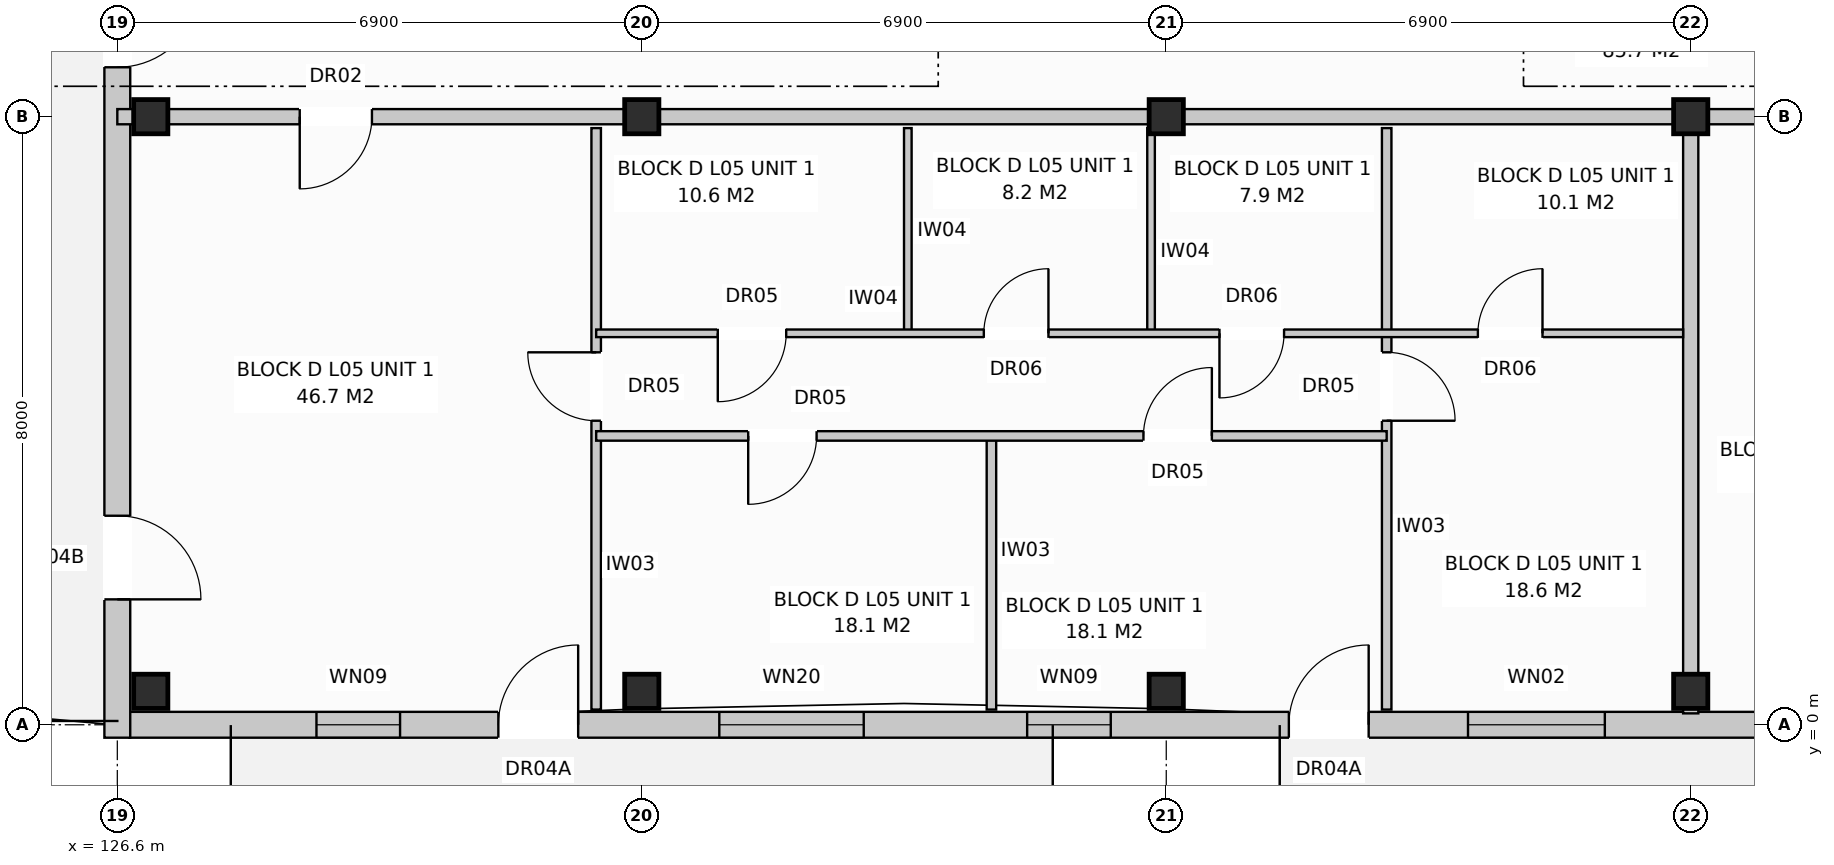
"""IFC4 building model, lengths in metres.
Left out: names, types, materials, properties, quantities, classifications, styles, units other than length and angle.
Written with IfcOpenShell. Run it as: python <this file> out.ifc"""

import sys

from ifc_helpers import new_model, si_unit, direction, frame, frame_2d, origin, origin_with_axes, origin_2d, place, context, subcontext, project, spatial, rectangle, extrude, element, fill, save


model = new_model("IFC4")
c1 = context("Model", 3, precision=1e-05, world=origin(), true_north=direction((0.0, 1.0)))
c2 = subcontext(c1, "Body", "Model", "MODEL_VIEW")
j1 = project(units=[si_unit("LENGTHUNIT", "METRE"), si_unit("PLANEANGLEUNIT", "RADIAN")], contexts=[c1])
p1 = place(None, origin())
s1 = spatial("IfcSite", under=j1, at=p1, CompositionType="ELEMENT")
p2 = place(p1, origin())
s2 = spatial("IfcBuilding", under=s1, at=p2, CompositionType="ELEMENT")
p3 = place(p2, frame((0.0, 0.0, 17.6)))
s3 = spatial("IfcBuildingStorey", under=s2, at=p3, CompositionType="ELEMENT", Elevation=17.6)
for number, where, z_axis, x_axis in (
    (1, (127.04, 0.44, 0.0), (0.0, 0.0, 1.0), (1.0, 0.0, 0.0)),
    (2, (127.04, 8.0, 0.0), (0.0, 0.0, 1.0), (1.0, 0.0, 0.0)),
    (3, (133.5, 0.44, 0.0), (0.0, 0.0, 1.0), (1.0, 0.0, 0.0)),
    (4, (133.5, 8.0, 0.0), (0.0, 0.0, 1.0), (1.0, 0.0, 0.0)),
    (5, (140.4, 0.44, 0.0), (0.0, 0.0, 1.0), (1.0, 0.0, 0.0)),
    (6, (140.4, 8.0, 0.0), (0.0, 0.0, 1.0), (1.0, 0.0, 0.0)),
    (7, (147.3, 0.44, 0.0), (0.0, 0.0, 1.0), (1.0, 0.0, 0.0)),
    (8, (147.3, 8.0, 0.0), (0.0, 0.0, 1.0), (1.0, 0.0, 0.0)),
):
    element("IfcColumn", number, at=place(p3, frame(where, z_axis=z_axis, x_axis=x_axis)), inside=s3, PredefinedType="COLUMN", context=c2, shape_type="SweptSolid", body=[
        extrude(rectangle(XDim=0.45, YDim=0.45, at=origin_2d()), origin(), (0.0, 0.0, 1.0), 3.2),
    ])
p4 = place(p3, frame((126.76, 0.0, 0.0), z_axis=(0.0, 0.0, 1.0), x_axis=(1.0, 0.0, 0.0)))
e9 = element("IfcWall", 9, at=p4, inside=s3, PredefinedType="STANDARD", context=c2, shape_type="SweptSolid", body=[
    extrude(rectangle(XDim=41.08, YDim=0.34, at=frame_2d((20.54, 0.0))), origin(), (0.0, 0.0, 1.0), 2.95),
])
p5 = place(p4, frame((4.853, 0.0, 0.0)))
e10 = element("IfcOpeningElement", 10, at=p5, cuts=e9, PredefinedType="OPENING", context=c2, shape_type="SweptSolid", body=[
    extrude(rectangle(XDim=1.05, YDim=2.12, at=frame_2d((0.525, 1.06))), frame((0.0, 0.182, 0.0), z_axis=(0.0, -1.0, 0.0), x_axis=(1.0, 0.0, 0.0)), (0.0, 0.0, 1.0), 0.364),
])
p6 = place(p4, frame((15.253, 0.0, 0.0)))
e11 = element("IfcOpeningElement", 11, at=p6, cuts=e9, PredefinedType="OPENING", context=c2, shape_type="SweptSolid", body=[
    extrude(rectangle(XDim=1.05, YDim=2.12, at=frame_2d((0.525, 1.06))), frame((0.0, 0.182, 0.0), z_axis=(0.0, -1.0, 0.0), x_axis=(1.0, 0.0, 0.0)), (0.0, 0.0, 1.0), 0.364),
])
p7 = place(p4, frame((30.353, 0.0, 0.0)))
e12 = element("IfcOpeningElement", 12, at=p7, cuts=e9, PredefinedType="OPENING", context=c2, shape_type="SweptSolid", body=[
    extrude(rectangle(XDim=1.05, YDim=2.12, at=frame_2d((0.525, 1.06))), frame((0.0, 0.182, 0.0), z_axis=(0.0, -1.0, 0.0), x_axis=(1.0, 0.0, 0.0)), (0.0, 0.0, 1.0), 0.364),
])
p8 = place(p4, frame((2.46, 0.0, 0.72)))
e13 = element("IfcOpeningElement", 13, at=p8, cuts=e9, PredefinedType="OPENING", context=c2, shape_type="SweptSolid", body=[
    extrude(rectangle(XDim=1.1, YDim=1.5, at=frame_2d((0.55, 0.75))), frame((0.0, 0.182, 0.0), z_axis=(0.0, -1.0, 0.0), x_axis=(1.0, 0.0, 0.0)), (0.0, 0.0, 1.0), 0.364),
])
p9 = place(p4, frame((7.76, 0.0, 0.72)))
e14 = element("IfcOpeningElement", 14, at=p9, cuts=e9, PredefinedType="OPENING", context=c2, shape_type="SweptSolid", body=[
    extrude(rectangle(XDim=1.9, YDim=1.85, at=frame_2d((0.95, 0.925))), frame((0.0, 0.182, 0.0), z_axis=(0.0, -1.0, 0.0), x_axis=(1.0, 0.0, 0.0)), (0.0, 0.0, 1.0), 0.364),
])
p10 = place(p4, frame((11.81, 0.0, 0.72)))
e15 = element("IfcOpeningElement", 15, at=p10, cuts=e9, PredefinedType="OPENING", context=c2, shape_type="SweptSolid", body=[
    extrude(rectangle(XDim=1.1, YDim=1.5, at=frame_2d((0.55, 0.75))), frame((0.0, 0.182, 0.0), z_axis=(0.0, -1.0, 0.0), x_axis=(1.0, 0.0, 0.0)), (0.0, 0.0, 1.0), 0.364),
])
p11 = place(p4, frame((17.61, 0.0, 0.8)))
e16 = element("IfcOpeningElement", 16, at=p11, cuts=e9, PredefinedType="OPENING", context=c2, shape_type="SweptSolid", body=[
    extrude(rectangle(XDim=1.8, YDim=1.7, at=frame_2d((0.9, 0.85))), frame((0.0, 0.182, 0.0), z_axis=(0.0, -1.0, 0.0), x_axis=(1.0, 0.0, 0.0)), (0.0, 0.0, 1.0), 0.364),
])
p12 = place(p4, frame((21.56, 0.0, 0.72)))
e17 = element("IfcOpeningElement", 17, at=p12, cuts=e9, PredefinedType="OPENING", context=c2, shape_type="SweptSolid", body=[
    extrude(rectangle(XDim=1.9, YDim=1.85, at=frame_2d((0.95, 0.925))), frame((0.0, 0.182, 0.0), z_axis=(0.0, -1.0, 0.0), x_axis=(1.0, 0.0, 0.0)), (0.0, 0.0, 1.0), 0.364),
])
p13 = place(p4, frame((25.36, 0.0, 0.72)))
e18 = element("IfcOpeningElement", 18, at=p13, cuts=e9, PredefinedType="OPENING", context=c2, shape_type="SweptSolid", body=[
    extrude(rectangle(XDim=1.1, YDim=1.5, at=frame_2d((0.55, 0.75))), frame((0.0, 0.182, 0.0), z_axis=(0.0, -1.0, 0.0), x_axis=(1.0, 0.0, 0.0)), (0.0, 0.0, 1.0), 0.364),
])
p14 = place(p4, frame((28.56, 0.0, 0.72)))
e19 = element("IfcOpeningElement", 19, at=p14, cuts=e9, PredefinedType="OPENING", context=c2, shape_type="SweptSolid", body=[
    extrude(rectangle(XDim=1.1, YDim=1.5, at=frame_2d((0.55, 0.75))), frame((0.0, 0.182, 0.0), z_axis=(0.0, -1.0, 0.0), x_axis=(1.0, 0.0, 0.0)), (0.0, 0.0, 1.0), 0.364),
])
p15 = place(p4, frame((31.96, 0.0, 0.72)))
e20 = element("IfcOpeningElement", 20, at=p15, cuts=e9, PredefinedType="OPENING", context=c2, shape_type="SweptSolid", body=[
    extrude(rectangle(XDim=1.9, YDim=1.85, at=frame_2d((0.95, 0.925))), frame((0.0, 0.182, 0.0), z_axis=(0.0, -1.0, 0.0), x_axis=(1.0, 0.0, 0.0)), (0.0, 0.0, 1.0), 0.364),
])
p16 = place(p4, frame((38.06, 0.0, 0.72)))
e21 = element("IfcOpeningElement", 21, at=p16, cuts=e9, PredefinedType="OPENING", context=c2, shape_type="SweptSolid", body=[
    extrude(rectangle(XDim=1.1, YDim=1.5, at=frame_2d((0.55, 0.75))), frame((0.0, 0.182, 0.0), z_axis=(0.0, -1.0, 0.0), x_axis=(1.0, 0.0, 0.0)), (0.0, 0.0, 1.0), 0.364),
])
p17 = place(p3, frame((126.6, -0.17, 0.0), z_axis=(0.0, 0.0, 1.0), x_axis=(0.0, 1.0, 0.0)))
e22 = element("IfcWall", 22, at=p17, inside=s3, PredefinedType="STANDARD", context=c2, shape_type="SweptSolid", body=[
    extrude(rectangle(XDim=18.74, YDim=0.34, at=frame_2d((9.37, 0.0))), origin(), (0.0, 0.0, 1.0), 2.95),
])
p18 = place(p17, frame((8.82, 0.0, 0.0)))
e23 = element("IfcOpeningElement", 23, at=p18, cuts=e22, PredefinedType="OPENING", context=c2, shape_type="SweptSolid", body=[
    extrude(rectangle(XDim=1.1, YDim=2.1, at=frame_2d((0.55, 1.05))), frame((0.0, 0.182, 0.0), z_axis=(0.0, -1.0, 0.0), x_axis=(1.0, 0.0, 0.0)), (0.0, 0.0, 1.0), 0.364),
])
p19 = place(p17, frame((1.82, 0.0, 0.0)))
e24 = element("IfcOpeningElement", 24, at=p19, cuts=e22, PredefinedType="OPENING", context=c2, shape_type="SweptSolid", body=[
    extrude(rectangle(XDim=1.1, YDim=2.1, at=frame_2d((0.55, 1.05))), frame((0.0, 0.182, 0.0), z_axis=(0.0, -1.0, 0.0), x_axis=(1.0, 0.0, 0.0)), (0.0, 0.0, 1.0), 0.364),
])
p20 = place(p3, frame((147.3, 7.85, 0.0), z_axis=(0.0, 0.0, 1.0), x_axis=(0.0, -1.0, 0.0)))
e25 = element("IfcWall", 25, at=p20, inside=s3, PredefinedType="PARTITIONING", context=c2, shape_type="SweptSolid", body=[
    extrude(rectangle(XDim=7.7, YDim=0.2, at=frame_2d((3.85, 0.0))), origin(), (0.0, 0.0, 1.0), 2.95),
])
p21 = place(p3, frame((126.6, 8.0, 0.0), z_axis=(0.0, 0.0, 1.0), x_axis=(1.0, 0.0, 0.0)))
e26 = element("IfcWall", 26, at=p21, inside=s3, PredefinedType="PARTITIONING", context=c2, shape_type="SweptSolid", body=[
    extrude(rectangle(XDim=20.7, YDim=0.2, at=frame_2d((10.35, 0.0))), origin(), (0.0, 0.0, 1.0), 2.39),
])
p22 = place(p21, frame((2.4, 0.0, 0.0)))
e27 = element("IfcOpeningElement", 27, at=p22, cuts=e26, PredefinedType="OPENING", context=c2, shape_type="SweptSolid", body=[
    extrude(rectangle(XDim=0.95, YDim=2.15, at=frame_2d((0.475, 1.075))), frame((0.0, 0.112, 0.0), z_axis=(0.0, -1.0, 0.0), x_axis=(1.0, 0.0, 0.0)), (0.0, 0.0, 1.0), 0.224),
])
p23 = place(p3, frame((132.9, 7.85, 0.0), z_axis=(0.0, 0.0, 1.0), x_axis=(0.0, -1.0, 0.0)))
e28 = element("IfcWall", 28, at=p23, inside=s3, PredefinedType="PARTITIONING", context=c2, shape_type="SweptSolid", body=[
    extrude(rectangle(XDim=7.65, YDim=0.125, at=frame_2d((3.825, 0.0))), origin(), (0.0, 0.0, 1.0), 2.95),
])
p24 = place(p23, frame((2.95, 0.0, 0.0)))
e29 = element("IfcOpeningElement", 29, at=p24, cuts=e28, PredefinedType="OPENING", context=c2, shape_type="SweptSolid", body=[
    extrude(rectangle(XDim=0.9, YDim=2.1, at=frame_2d((0.45, 1.05))), frame((0.0, 0.074, 0.0), z_axis=(0.0, -1.0, 0.0), x_axis=(1.0, 0.0, 0.0)), (0.0, 0.0, 1.0), 0.149),
])
for number, where, z_axis, x_axis in (
    (30, (137.0, 7.85, 0.0), (0.0, 0.0, 1.0), (0.0, -1.0, 0.0)),
    (31, (140.2, 7.85, 0.0), (0.0, 0.0, 1.0), (0.0, -1.0, 0.0)),
):
    element("IfcWall", number, at=place(p3, frame(where, z_axis=z_axis, x_axis=x_axis)), inside=s3, PredefinedType="PARTITIONING", context=c2, shape_type="SweptSolid", body=[
        extrude(rectangle(XDim=2.7, YDim=0.1, at=frame_2d((1.35, 0.0))), origin(), (0.0, 0.0, 1.0), 2.95),
    ])
p25 = place(p3, frame((138.1, 3.8, 0.0), z_axis=(0.0, 0.0, 1.0), x_axis=(0.0, -1.0, 0.0)))
e32 = element("IfcWall", 32, at=p25, inside=s3, PredefinedType="PARTITIONING", context=c2, shape_type="SweptSolid", body=[
    extrude(rectangle(XDim=3.6, YDim=0.125, at=frame_2d((1.8, 0.0))), origin(), (0.0, 0.0, 1.0), 2.59),
])
p26 = place(p3, frame((143.3, 7.85, 0.0), z_axis=(0.0, 0.0, 1.0), x_axis=(0.0, -1.0, 0.0)))
e33 = element("IfcWall", 33, at=p26, inside=s3, PredefinedType="PARTITIONING", context=c2, shape_type="SweptSolid", body=[
    extrude(rectangle(XDim=7.65, YDim=0.125, at=frame_2d((3.825, 0.0))), origin(), (0.0, 0.0, 1.0), 2.95),
])
p27 = place(p26, frame((2.95, 0.0, 0.0)))
e34 = element("IfcOpeningElement", 34, at=p27, cuts=e33, PredefinedType="OPENING", context=c2, shape_type="SweptSolid", body=[
    extrude(rectangle(XDim=0.9, YDim=2.1, at=frame_2d((0.45, 1.05))), frame((0.0, 0.074, 0.0), z_axis=(0.0, -1.0, 0.0), x_axis=(1.0, 0.0, 0.0)), (0.0, 0.0, 1.0), 0.149),
])
p28 = place(p3, frame((132.9, 5.15, 0.0), z_axis=(0.0, 0.0, 1.0), x_axis=(1.0, 0.0, 0.0)))
e35 = element("IfcWall", 35, at=p28, inside=s3, PredefinedType="PARTITIONING", context=c2, shape_type="SweptSolid", body=[
    extrude(rectangle(XDim=14.3, YDim=0.1, at=frame_2d((7.15, 0.0))), origin(), (0.0, 0.0, 1.0), 2.95),
])
p29 = place(p28, frame((1.6, 0.0, 0.0)))
e36 = element("IfcOpeningElement", 36, at=p29, cuts=e35, PredefinedType="OPENING", context=c2, shape_type="SweptSolid", body=[
    extrude(rectangle(XDim=0.9, YDim=2.1, at=frame_2d((0.45, 1.05))), frame((0.0, 0.062, 0.0), z_axis=(0.0, -1.0, 0.0), x_axis=(1.0, 0.0, 0.0)), (0.0, 0.0, 1.0), 0.124),
])
p30 = place(p28, frame((5.1, 0.0, 0.0)))
e37 = element("IfcOpeningElement", 37, at=p30, cuts=e35, PredefinedType="OPENING", context=c2, shape_type="SweptSolid", body=[
    extrude(rectangle(XDim=0.85, YDim=2.05, at=frame_2d((0.425, 1.025))), frame((0.0, 0.062, 0.0), z_axis=(0.0, -1.0, 0.0), x_axis=(1.0, 0.0, 0.0)), (0.0, 0.0, 1.0), 0.124),
])
p31 = place(p28, frame((8.2, 0.0, 0.0)))
e38 = element("IfcOpeningElement", 38, at=p31, cuts=e35, PredefinedType="OPENING", context=c2, shape_type="SweptSolid", body=[
    extrude(rectangle(XDim=0.85, YDim=2.05, at=frame_2d((0.425, 1.025))), frame((0.0, 0.062, 0.0), z_axis=(0.0, -1.0, 0.0), x_axis=(1.0, 0.0, 0.0)), (0.0, 0.0, 1.0), 0.124),
])
p32 = place(p28, frame((11.6, 0.0, 0.0)))
e39 = element("IfcOpeningElement", 39, at=p32, cuts=e35, PredefinedType="OPENING", context=c2, shape_type="SweptSolid", body=[
    extrude(rectangle(XDim=0.85, YDim=2.05, at=frame_2d((0.425, 1.025))), frame((0.0, 0.062, 0.0), z_axis=(0.0, -1.0, 0.0), x_axis=(1.0, 0.0, 0.0)), (0.0, 0.0, 1.0), 0.124),
])
p33 = place(p3, frame((132.9, 3.8, 0.0), z_axis=(0.0, 0.0, 1.0), x_axis=(1.0, 0.0, 0.0)))
e40 = element("IfcWall", 40, at=p33, inside=s3, PredefinedType="PARTITIONING", context=c2, shape_type="SweptSolid", body=[
    extrude(rectangle(XDim=10.4, YDim=0.125, at=frame_2d((5.2, 0.0))), origin(), (0.0, 0.0, 1.0), 2.95),
])
p34 = place(p33, frame((2.0, 0.0, 0.0)))
e41 = element("IfcOpeningElement", 41, at=p34, cuts=e40, PredefinedType="OPENING", context=c2, shape_type="SweptSolid", body=[
    extrude(rectangle(XDim=0.9, YDim=2.1, at=frame_2d((0.45, 1.05))), frame((0.0, 0.074, 0.0), z_axis=(0.0, -1.0, 0.0), x_axis=(1.0, 0.0, 0.0)), (0.0, 0.0, 1.0), 0.149),
])
p35 = place(p33, frame((7.2, 0.0, 0.0)))
e42 = element("IfcOpeningElement", 42, at=p35, cuts=e40, PredefinedType="OPENING", context=c2, shape_type="SweptSolid", body=[
    extrude(rectangle(XDim=0.9, YDim=2.1, at=frame_2d((0.45, 1.05))), frame((0.0, 0.074, 0.0), z_axis=(0.0, -1.0, 0.0), x_axis=(1.0, 0.0, 0.0)), (0.0, 0.0, 1.0), 0.149),
])
p36 = place(p3, frame((147.3, 8.0, 0.0), z_axis=(0.0, 0.0, 1.0), x_axis=(1.0, 0.0, 0.0)))
e43 = element("IfcWall", 43, at=p36, inside=s3, PredefinedType="PARTITIONING", context=c2, shape_type="SweptSolid", body=[
    extrude(rectangle(XDim=6.9, YDim=0.2, at=frame_2d((3.45, 0.0))), origin(), (0.0, 0.0, 1.0), 2.39),
])
p37 = place(p36, frame((2.0, 0.0, 0.0)))
e44 = element("IfcOpeningElement", 44, at=p37, cuts=e43, PredefinedType="OPENING", context=c2, shape_type="SweptSolid", body=[
    extrude(rectangle(XDim=0.95, YDim=2.15, at=frame_2d((0.475, 1.075))), frame((0.0, 0.112, 0.0), z_axis=(0.0, -1.0, 0.0), x_axis=(1.0, 0.0, 0.0)), (0.0, 0.0, 1.0), 0.224),
])
p38 = place(p5, origin_with_axes())
e45 = element("IfcDoor", 45, at=p38, inside=s3, OperationType="SINGLE_SWING_RIGHT", PredefinedType="DOOR", context=c2, shape_type="SweptSolid", body=[
    extrude(rectangle(XDim=1.05, YDim=2.12, at=frame_2d((0.525, 1.06))), frame((0.0, 0.025, 0.0), z_axis=(0.0, -1.0, 0.0), x_axis=(1.0, 0.0, 0.0)), (0.0, 0.0, 1.0), 0.05),
])
fill(e10, e45)
p39 = place(p6, origin_with_axes())
e46 = element("IfcDoor", 46, at=p39, inside=s3, OperationType="SINGLE_SWING_RIGHT", PredefinedType="DOOR", context=c2, shape_type="SweptSolid", body=[
    extrude(rectangle(XDim=1.05, YDim=2.12, at=frame_2d((0.525, 1.06))), frame((0.0, 0.025, 0.0), z_axis=(0.0, -1.0, 0.0), x_axis=(1.0, 0.0, 0.0)), (0.0, 0.0, 1.0), 0.05),
])
fill(e11, e46)
p40 = place(p8, origin_with_axes())
e47 = element("IfcWindow", 47, at=p40, inside=s3, PartitioningType="SINGLE_PANEL", PredefinedType="WINDOW", context=c2, shape_type="SweptSolid", body=[
    extrude(rectangle(XDim=1.1, YDim=1.5, at=frame_2d((0.55, 0.75))), frame((0.0, 0.03, 0.0), z_axis=(0.0, -1.0, 0.0), x_axis=(1.0, 0.0, 0.0)), (0.0, 0.0, 1.0), 0.06),
])
fill(e13, e47)
p41 = place(p9, origin_with_axes())
e48 = element("IfcWindow", 48, at=p41, inside=s3, PartitioningType="SINGLE_PANEL", PredefinedType="WINDOW", context=c2, shape_type="SweptSolid", body=[
    extrude(rectangle(XDim=1.9, YDim=1.85, at=frame_2d((0.95, 0.925))), frame((0.0, 0.03, 0.0), z_axis=(0.0, -1.0, 0.0), x_axis=(1.0, 0.0, 0.0)), (0.0, 0.0, 1.0), 0.06),
])
fill(e14, e48)
p42 = place(p10, origin_with_axes())
e49 = element("IfcWindow", 49, at=p42, inside=s3, PartitioningType="SINGLE_PANEL", PredefinedType="WINDOW", context=c2, shape_type="SweptSolid", body=[
    extrude(rectangle(XDim=1.1, YDim=1.5, at=frame_2d((0.55, 0.75))), frame((0.0, 0.03, 0.0), z_axis=(0.0, -1.0, 0.0), x_axis=(1.0, 0.0, 0.0)), (0.0, 0.0, 1.0), 0.06),
])
fill(e15, e49)
p43 = place(p11, origin_with_axes())
e50 = element("IfcWindow", 50, at=p43, inside=s3, PartitioningType="SINGLE_PANEL", PredefinedType="WINDOW", context=c2, shape_type="SweptSolid", body=[
    extrude(rectangle(XDim=1.8, YDim=1.7, at=frame_2d((0.9, 0.85))), frame((0.0, 0.03, 0.0), z_axis=(0.0, -1.0, 0.0), x_axis=(1.0, 0.0, 0.0)), (0.0, 0.0, 1.0), 0.06),
])
fill(e16, e50)
p44 = place(p18, frame((1.1, 0.0, 0.0), z_axis=(0.0, 0.0, 1.0), x_axis=(-1.0, 0.0, 0.0)))
e51 = element("IfcDoor", 51, at=p44, inside=s3, OperationType="SINGLE_SWING_RIGHT", PredefinedType="DOOR", context=c2, shape_type="SweptSolid", body=[
    extrude(rectangle(XDim=1.1, YDim=2.1, at=frame_2d((0.55, 1.05))), frame((0.0, 0.025, 0.0), z_axis=(0.0, -1.0, 0.0), x_axis=(1.0, 0.0, 0.0)), (0.0, 0.0, 1.0), 0.05),
])
fill(e23, e51)
p45 = place(p19, frame((1.1, 0.0, 0.0), z_axis=(0.0, 0.0, 1.0), x_axis=(-1.0, 0.0, 0.0)))
e52 = element("IfcDoor", 52, at=p45, inside=s3, OperationType="SINGLE_SWING_LEFT", PredefinedType="DOOR", context=c2, shape_type="SweptSolid", body=[
    extrude(rectangle(XDim=1.1, YDim=2.1, at=frame_2d((0.55, 1.05))), frame((0.0, 0.025, 0.0), z_axis=(0.0, -1.0, 0.0), x_axis=(1.0, 0.0, 0.0)), (0.0, 0.0, 1.0), 0.05),
])
fill(e24, e52)
p46 = place(p22, frame((0.95, 0.0, 0.0), z_axis=(0.0, 0.0, 1.0), x_axis=(-1.0, 0.0, 0.0)))
e53 = element("IfcDoor", 53, at=p46, inside=s3, OperationType="SINGLE_SWING_LEFT", PredefinedType="DOOR", context=c2, shape_type="SweptSolid", body=[
    extrude(rectangle(XDim=0.95, YDim=2.15, at=frame_2d((0.475, 1.075))), frame((0.0, 0.025, 0.0), z_axis=(0.0, -1.0, 0.0), x_axis=(1.0, 0.0, 0.0)), (0.0, 0.0, 1.0), 0.05),
])
fill(e27, e53)
p47 = place(p24, frame((0.9, 0.0, 0.0), z_axis=(0.0, 0.0, 1.0), x_axis=(-1.0, 0.0, 0.0)))
e54 = element("IfcDoor", 54, at=p47, inside=s3, OperationType="SINGLE_SWING_LEFT", PredefinedType="DOOR", context=c2, shape_type="SweptSolid", body=[
    extrude(rectangle(XDim=0.9, YDim=2.1, at=frame_2d((0.45, 1.05))), frame((0.0, 0.025, 0.0), z_axis=(0.0, -1.0, 0.0), x_axis=(1.0, 0.0, 0.0)), (0.0, 0.0, 1.0), 0.05),
])
fill(e29, e54)
p48 = place(p27, origin_with_axes())
e55 = element("IfcDoor", 55, at=p48, inside=s3, OperationType="SINGLE_SWING_RIGHT", PredefinedType="DOOR", context=c2, shape_type="SweptSolid", body=[
    extrude(rectangle(XDim=0.9, YDim=2.1, at=frame_2d((0.45, 1.05))), frame((0.0, 0.025, 0.0), z_axis=(0.0, -1.0, 0.0), x_axis=(1.0, 0.0, 0.0)), (0.0, 0.0, 1.0), 0.05),
])
fill(e34, e55)
p49 = place(p29, frame((0.9, 0.0, 0.0), z_axis=(0.0, 0.0, 1.0), x_axis=(-1.0, 0.0, 0.0)))
e56 = element("IfcDoor", 56, at=p49, inside=s3, OperationType="SINGLE_SWING_LEFT", PredefinedType="DOOR", context=c2, shape_type="SweptSolid", body=[
    extrude(rectangle(XDim=0.9, YDim=2.1, at=frame_2d((0.45, 1.05))), frame((0.0, 0.025, 0.0), z_axis=(0.0, -1.0, 0.0), x_axis=(1.0, 0.0, 0.0)), (0.0, 0.0, 1.0), 0.05),
])
fill(e36, e56)
p50 = place(p30, origin_with_axes())
e57 = element("IfcDoor", 57, at=p50, inside=s3, OperationType="SINGLE_SWING_RIGHT", PredefinedType="DOOR", context=c2, shape_type="SweptSolid", body=[
    extrude(rectangle(XDim=0.85, YDim=2.05, at=frame_2d((0.425, 1.025))), frame((0.0, 0.025, 0.0), z_axis=(0.0, -1.0, 0.0), x_axis=(1.0, 0.0, 0.0)), (0.0, 0.0, 1.0), 0.05),
])
fill(e37, e57)
p51 = place(p31, frame((0.85, 0.0, 0.0), z_axis=(0.0, 0.0, 1.0), x_axis=(-1.0, 0.0, 0.0)))
e58 = element("IfcDoor", 58, at=p51, inside=s3, OperationType="SINGLE_SWING_LEFT", PredefinedType="DOOR", context=c2, shape_type="SweptSolid", body=[
    extrude(rectangle(XDim=0.85, YDim=2.05, at=frame_2d((0.425, 1.025))), frame((0.0, 0.025, 0.0), z_axis=(0.0, -1.0, 0.0), x_axis=(1.0, 0.0, 0.0)), (0.0, 0.0, 1.0), 0.05),
])
fill(e38, e58)
p52 = place(p32, origin_with_axes())
e59 = element("IfcDoor", 59, at=p52, inside=s3, OperationType="SINGLE_SWING_RIGHT", PredefinedType="DOOR", context=c2, shape_type="SweptSolid", body=[
    extrude(rectangle(XDim=0.85, YDim=2.05, at=frame_2d((0.425, 1.025))), frame((0.0, 0.025, 0.0), z_axis=(0.0, -1.0, 0.0), x_axis=(1.0, 0.0, 0.0)), (0.0, 0.0, 1.0), 0.05),
])
fill(e39, e59)
p53 = place(p34, frame((0.9, 0.0, 0.0), z_axis=(0.0, 0.0, 1.0), x_axis=(-1.0, 0.0, 0.0)))
e60 = element("IfcDoor", 60, at=p53, inside=s3, OperationType="SINGLE_SWING_LEFT", PredefinedType="DOOR", context=c2, shape_type="SweptSolid", body=[
    extrude(rectangle(XDim=0.9, YDim=2.1, at=frame_2d((0.45, 1.05))), frame((0.0, 0.025, 0.0), z_axis=(0.0, -1.0, 0.0), x_axis=(1.0, 0.0, 0.0)), (0.0, 0.0, 1.0), 0.05),
])
fill(e41, e60)
p54 = place(p35, origin_with_axes())
e61 = element("IfcDoor", 61, at=p54, inside=s3, OperationType="SINGLE_SWING_RIGHT", PredefinedType="DOOR", context=c2, shape_type="SweptSolid", body=[
    extrude(rectangle(XDim=0.9, YDim=2.1, at=frame_2d((0.45, 1.05))), frame((0.0, 0.025, 0.0), z_axis=(0.0, -1.0, 0.0), x_axis=(1.0, 0.0, 0.0)), (0.0, 0.0, 1.0), 0.05),
])
fill(e42, e61)
save(model, sys.argv[1])
